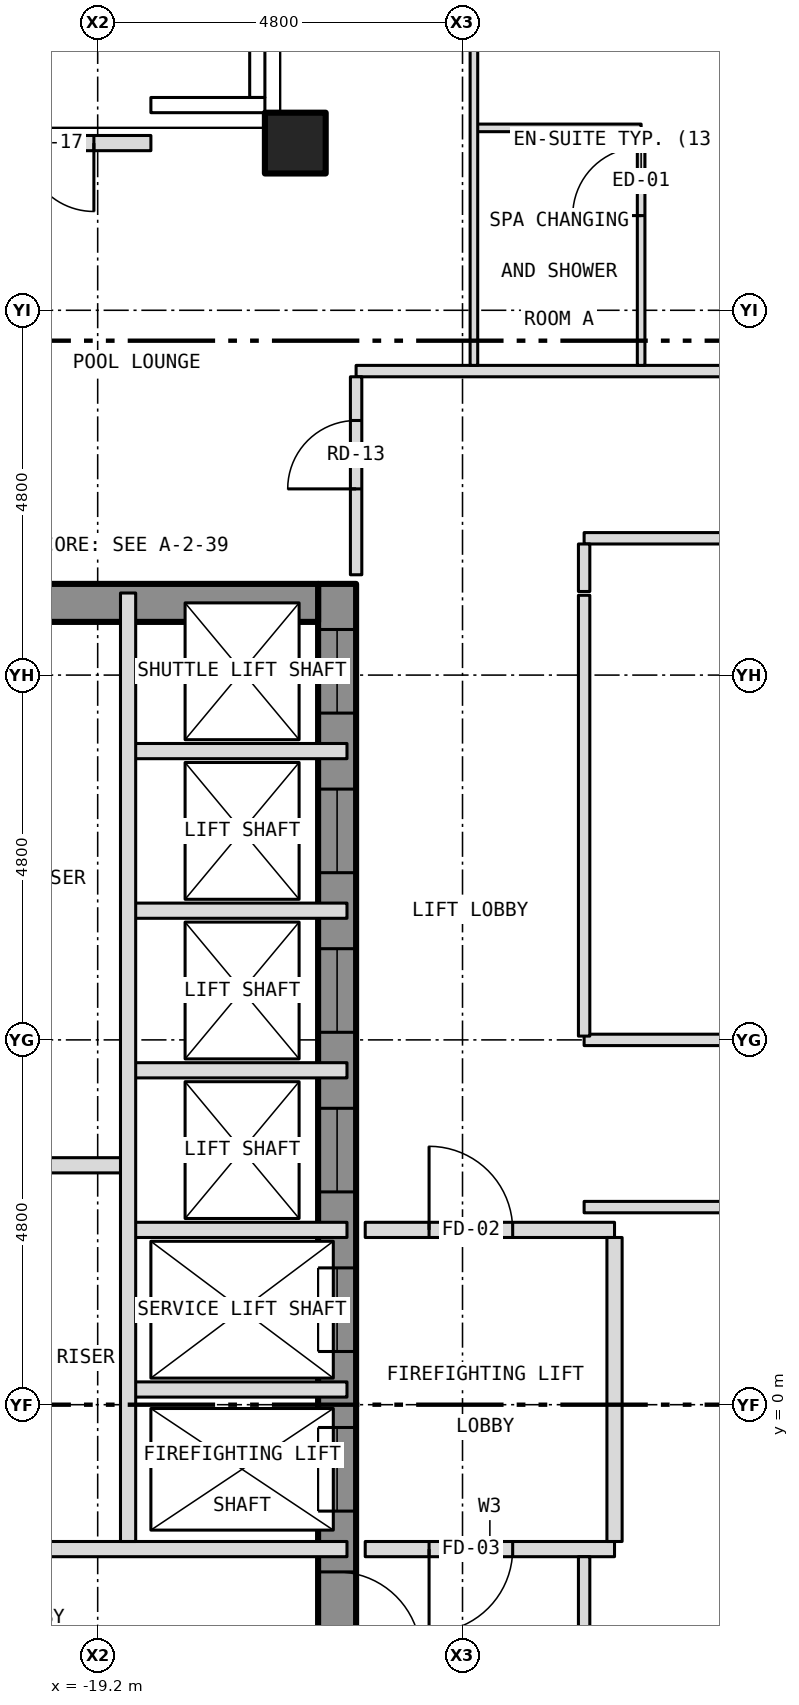
"""IFC4 building model, lengths in metres.
Left out: names, types, materials, properties, quantities, classifications, styles, units other than length and angle.
Written with IfcOpenShell. Run it as: python <this file> out.ifc"""

import sys

from ifc_helpers import new_model, si_unit, direction, frame, frame_2d, origin, origin_2d, place, context, subcontext, project, spatial, rectangle, hollow_rectangle, extrude, element, fill, save


model = new_model("IFC4")
c1 = context("Model", 3, precision=1e-05, world=origin(), true_north=direction((0.0, 1.0)))
c2 = subcontext(c1, "Body", "Model", "MODEL_VIEW")
j1 = project(units=[si_unit("LENGTHUNIT", "METRE"), si_unit("PLANEANGLEUNIT", "RADIAN")], contexts=[c1])
p1 = place(None, origin())
s1 = spatial("IfcSite", under=j1, at=p1, CompositionType="ELEMENT")
p2 = place(p1, origin())
s2 = spatial("IfcBuilding", under=s1, at=p2, CompositionType="ELEMENT")
p3 = place(p2, frame((0.0, 0.0, 142.5)))
s3 = spatial("IfcBuildingStorey", under=s2, at=p3, CompositionType="ELEMENT", Elevation=142.5)
p4 = place(p3, frame((-16.6, 16.6, -0.2), z_axis=(0.0, 0.0, 1.0), x_axis=(1.0, 0.0, 0.0)))
e1 = element("IfcColumn", 1, at=p4, inside=s3, PredefinedType="COLUMN", context=c2, shape_type="SweptSolid", body=[
    extrude(hollow_rectangle(XDim=0.8, YDim=0.8, WallThickness=0.045, at=origin_2d()), origin(), (0.0, 0.0, 1.0), 5.55),
])
p5 = place(p3, frame((-16.05, -10.8, 0.0), z_axis=(0.0, 0.0, 1.0), x_axis=(0.0, 1.0, 0.0)))
e2 = element("IfcWall", 2, at=p5, inside=s3, PredefinedType="SHEAR", context=c2, shape_type="SweptSolid", body=[
    extrude(rectangle(XDim=21.6, YDim=0.5, at=frame_2d((10.8, 0.0))), origin(), (0.0, 0.0, 1.0), 5.25),
])
p6 = place(p5, frame((9.4, 0.0, 0.0)))
e3 = element("IfcOpeningElement", 3, at=p6, cuts=e2, PredefinedType="OPENING", context=c2, shape_type="SweptSolid", body=[
    extrude(rectangle(XDim=1.1, YDim=2.1, at=frame_2d((0.55, 1.05))), frame((0.0, 0.262, 0.0), z_axis=(0.0, -1.0, 0.0), x_axis=(1.0, 0.0, 0.0)), (0.0, 0.0, 1.0), 0.524),
])
p7 = place(p5, frame((11.5, 0.0, 0.0)))
e4 = element("IfcOpeningElement", 4, at=p7, cuts=e2, PredefinedType="OPENING", context=c2, shape_type="SweptSolid", body=[
    extrude(rectangle(XDim=1.1, YDim=2.1, at=frame_2d((0.55, 1.05))), frame((0.0, 0.262, 0.0), z_axis=(0.0, -1.0, 0.0), x_axis=(1.0, 0.0, 0.0)), (0.0, 0.0, 1.0), 0.524),
])
p8 = place(p5, frame((13.6, 0.0, 0.0)))
e5 = element("IfcOpeningElement", 5, at=p8, cuts=e2, PredefinedType="OPENING", context=c2, shape_type="SweptSolid", body=[
    extrude(rectangle(XDim=1.1, YDim=2.1, at=frame_2d((0.55, 1.05))), frame((0.0, 0.262, 0.0), z_axis=(0.0, -1.0, 0.0), x_axis=(1.0, 0.0, 0.0)), (0.0, 0.0, 1.0), 0.524),
])
p9 = place(p5, frame((15.7, 0.0, 0.0)))
e6 = element("IfcOpeningElement", 6, at=p9, cuts=e2, PredefinedType="OPENING", context=c2, shape_type="SweptSolid", body=[
    extrude(rectangle(XDim=1.1, YDim=2.1, at=frame_2d((0.55, 1.05))), frame((0.0, 0.262, 0.0), z_axis=(0.0, -1.0, 0.0), x_axis=(1.0, 0.0, 0.0)), (0.0, 0.0, 1.0), 0.524),
])
p10 = place(p5, frame((17.8, 0.0, 0.0)))
e7 = element("IfcOpeningElement", 7, at=p10, cuts=e2, PredefinedType="OPENING", context=c2, shape_type="SweptSolid", body=[
    extrude(rectangle(XDim=1.1, YDim=2.1, at=frame_2d((0.55, 1.05))), frame((0.0, 0.262, 0.0), z_axis=(0.0, -1.0, 0.0), x_axis=(1.0, 0.0, 0.0)), (0.0, 0.0, 1.0), 0.524),
])
p11 = place(p5, frame((19.9, 0.0, 0.0)))
e8 = element("IfcOpeningElement", 8, at=p11, cuts=e2, PredefinedType="OPENING", context=c2, shape_type="SweptSolid", body=[
    extrude(rectangle(XDim=1.1, YDim=2.1, at=frame_2d((0.55, 1.05))), frame((0.0, 0.262, 0.0), z_axis=(0.0, -1.0, 0.0), x_axis=(1.0, 0.0, 0.0)), (0.0, 0.0, 1.0), 0.524),
])
p12 = place(p5, frame((0.758, 0.0, 0.0)))
e9 = element("IfcOpeningElement", 9, at=p12, cuts=e2, PredefinedType="OPENING", context=c2, shape_type="SweptSolid", body=[
    extrude(rectangle(XDim=1.1, YDim=2.1, at=frame_2d((0.55, 1.05))), frame((0.0, 0.262, 0.0), z_axis=(0.0, -1.0, 0.0), x_axis=(1.0, 0.0, 0.0)), (0.0, 0.0, 1.0), 0.524),
])
p13 = place(p5, frame((7.5, 0.0, 0.0)))
e10 = element("IfcOpeningElement", 10, at=p13, cuts=e2, PredefinedType="OPENING", context=c2, shape_type="SweptSolid", body=[
    extrude(rectangle(XDim=1.1, YDim=2.1, at=frame_2d((0.55, 1.05))), frame((0.0, 0.262, 0.0), z_axis=(0.0, -1.0, 0.0), x_axis=(1.0, 0.0, 0.0)), (0.0, 0.0, 1.0), 0.524),
])
p14 = place(p3, frame((-21.1, 10.55, 0.0), z_axis=(0.0, 0.0, 1.0), x_axis=(1.0, 0.0, 0.0)))
e11 = element("IfcWall", 11, at=p14, inside=s3, PredefinedType="SHEAR", context=c2, shape_type="SweptSolid", body=[
    extrude(rectangle(XDim=4.8, YDim=0.5, at=frame_2d((2.4, 0.0))), origin(), (0.0, 0.0, 1.0), 5.25),
])
p15 = place(p3, frame((-18.5, 16.6, 0.0), z_axis=(0.0, 0.0, 1.0), x_axis=(-1.0, 0.0, 0.0)))
e12 = element("IfcWall", 12, at=p15, inside=s3, PredefinedType="SOLIDWALL", context=c2, shape_type="SweptSolid", body=[
    extrude(rectangle(XDim=2.7, YDim=0.2, at=frame_2d((1.35, 0.0))), origin(), (0.0, 0.0, 1.0), 4.743),
])
p16 = place(p15, frame((0.75, 0.0, 0.0)))
e13 = element("IfcOpeningElement", 13, at=p16, cuts=e12, PredefinedType="OPENING", context=c2, shape_type="SweptSolid", body=[
    extrude(rectangle(XDim=0.9, YDim=2.1, at=frame_2d((0.45, 1.05))), frame((0.0, 0.112, 0.0), z_axis=(0.0, -1.0, 0.0), x_axis=(1.0, 0.0, 0.0)), (0.0, 0.0, 1.0), 0.224),
])
p17 = place(p3, frame((-21.48, -1.9, 0.0), z_axis=(0.0, 0.0, 1.0), x_axis=(1.0, 0.0, 0.0)))
e14 = element("IfcWall", 14, at=p17, inside=s3, PredefinedType="PARTITIONING", context=c2, shape_type="SweptSolid", body=[
    extrude(rectangle(XDim=5.56, YDim=0.2, at=frame_2d((2.78, 0.0))), origin(), (0.0, 0.0, 1.0), 5.25),
])
p18 = place(p3, frame((-15.68, -1.9, 0.0), z_axis=(0.0, 0.0, 1.0), x_axis=(1.0, 0.0, 0.0)))
e15 = element("IfcWall", 15, at=p18, inside=s3, PredefinedType="PARTITIONING", context=c2, shape_type="SweptSolid", body=[
    extrude(rectangle(XDim=3.28, YDim=0.2, at=frame_2d((1.64, 0.0))), origin(), (0.0, 0.0, 1.0), 5.35),
])
p19 = place(p18, frame((0.84, 0.0, 0.0)))
e16 = element("IfcOpeningElement", 16, at=p19, cuts=e15, PredefinedType="OPENING", context=c2, shape_type="SweptSolid", body=[
    extrude(rectangle(XDim=1.1, YDim=2.1, at=frame_2d((0.55, 1.05))), frame((0.0, 0.112, 0.0), z_axis=(0.0, -1.0, 0.0), x_axis=(1.0, 0.0, 0.0)), (0.0, 0.0, 1.0), 0.224),
])
for number, where, z_axis, x_axis in (
    (17, (-18.8, 0.2, 0.0), (0.0, 0.0, 1.0), (1.0, 0.0, 0.0)),
    (18, (-18.8, 2.3, 0.0), (0.0, 0.0, 1.0), (1.0, 0.0, 0.0)),
):
    element("IfcWall", number, at=place(p3, frame(where, z_axis=z_axis, x_axis=x_axis)), inside=s3, PredefinedType="PARTITIONING", context=c2, shape_type="SweptSolid", body=[
        extrude(rectangle(XDim=2.88, YDim=0.2, at=frame_2d((1.44, 0.0))), origin(), (0.0, 0.0, 1.0), 5.25),
    ])
p20 = place(p3, frame((-15.68, 2.3, 0.0), z_axis=(0.0, 0.0, 1.0), x_axis=(1.0, 0.0, 0.0)))
e19 = element("IfcWall", 19, at=p20, inside=s3, PredefinedType="PARTITIONING", context=c2, shape_type="SweptSolid", body=[
    extrude(rectangle(XDim=3.28, YDim=0.2, at=frame_2d((1.64, 0.0))), origin(), (0.0, 0.0, 1.0), 5.35),
])
p21 = place(p20, frame((0.84, 0.0, 0.0)))
e20 = element("IfcOpeningElement", 20, at=p21, cuts=e19, PredefinedType="OPENING", context=c2, shape_type="SweptSolid", body=[
    extrude(rectangle(XDim=1.1, YDim=2.1, at=frame_2d((0.55, 1.05))), frame((0.0, 0.112, 0.0), z_axis=(0.0, -1.0, 0.0), x_axis=(1.0, 0.0, 0.0)), (0.0, 0.0, 1.0), 0.224),
])
p22 = place(p3, frame((-12.8, 2.6, 0.0), z_axis=(0.0, 0.0, 1.0), x_axis=(1.0, 0.0, 0.0)))
e21 = element("IfcWall", 21, at=p22, inside=s3, PredefinedType="PARTITIONING", context=c2, shape_type="SweptSolid", body=[
    extrude(rectangle(XDim=20.3, YDim=0.15, at=frame_2d((10.15, 0.0))), origin(), (0.0, 0.0, 1.0), 5.35),
])
p23 = place(p3, frame((-21.48, 3.15, 0.0), z_axis=(0.0, 0.0, 1.0), x_axis=(1.0, 0.0, 0.0)))
e22 = element("IfcWall", 22, at=p23, inside=s3, PredefinedType="PARTITIONING", context=c2, shape_type="SweptSolid", body=[
    extrude(rectangle(XDim=2.68, YDim=0.2, at=frame_2d((1.34, 0.0))), origin(), (0.0, 0.0, 1.0), 5.25),
])
p24 = place(p3, frame((-18.8, 4.4, 0.0), z_axis=(0.0, 0.0, 1.0), x_axis=(1.0, 0.0, 0.0)))
e23 = element("IfcWall", 23, at=p24, inside=s3, PredefinedType="PARTITIONING", context=c2, shape_type="SweptSolid", body=[
    extrude(rectangle(XDim=2.88, YDim=0.2, at=frame_2d((1.44, 0.0))), origin(), (0.0, 0.0, 1.0), 5.25),
])
p25 = place(p3, frame((-12.8, 4.8, 0.0), z_axis=(0.0, 0.0, 1.0), x_axis=(1.0, 0.0, 0.0)))
e24 = element("IfcWall", 24, at=p25, inside=s3, PredefinedType="PARTITIONING", context=c2, shape_type="SweptSolid", body=[
    extrude(rectangle(XDim=20.3, YDim=0.15, at=frame_2d((10.15, 0.0))), origin(), (0.0, 0.0, 1.0), 5.35),
])
p26 = place(p25, frame((16.1, 0.0, 0.0)))
e25 = element("IfcOpeningElement", 25, at=p26, cuts=e24, PredefinedType="OPENING", context=c2, shape_type="SweptSolid", body=[
    extrude(rectangle(XDim=0.9, YDim=2.1, at=frame_2d((0.45, 1.05))), frame((0.0, 0.087, 0.0), z_axis=(0.0, -1.0, 0.0), x_axis=(1.0, 0.0, 0.0)), (0.0, 0.0, 1.0), 0.174),
])
for number, where, z_axis, x_axis in (
    (26, (-18.8, 6.5, 0.0), (0.0, 0.0, 1.0), (1.0, 0.0, 0.0)),
    (27, (-18.8, 8.6, 0.0), (0.0, 0.0, 1.0), (1.0, 0.0, 0.0)),
):
    element("IfcWall", number, at=place(p3, frame(where, z_axis=z_axis, x_axis=x_axis)), inside=s3, PredefinedType="PARTITIONING", context=c2, shape_type="SweptSolid", body=[
        extrude(rectangle(XDim=2.88, YDim=0.2, at=frame_2d((1.44, 0.0))), origin(), (0.0, 0.0, 1.0), 5.25),
    ])
p27 = place(p3, frame((-12.8, 11.4, 0.0), z_axis=(0.0, 0.0, 1.0), x_axis=(1.0, 0.0, 0.0)))
e28 = element("IfcWall", 28, at=p27, inside=s3, PredefinedType="PARTITIONING", context=c2, shape_type="SweptSolid", body=[
    extrude(rectangle(XDim=20.3, YDim=0.15, at=frame_2d((10.15, 0.0))), origin(), (0.0, 0.0, 1.0), 5.35),
])
p28 = place(p27, frame((5.95, 0.0, 0.0)))
e29 = element("IfcOpeningElement", 29, at=p28, cuts=e28, PredefinedType="OPENING", context=c2, shape_type="SweptSolid", body=[
    extrude(rectangle(XDim=0.9, YDim=2.1, at=frame_2d((0.45, 1.05))), frame((0.0, 0.087, 0.0), z_axis=(0.0, -1.0, 0.0), x_axis=(1.0, 0.0, 0.0)), (0.0, 0.0, 1.0), 0.174),
])
p29 = place(p3, frame((-15.8, 13.6, 0.0), z_axis=(0.0, 0.0, 1.0), x_axis=(1.0, 0.0, 0.0)))
e30 = element("IfcWall", 30, at=p29, inside=s3, PredefinedType="PARTITIONING", context=c2, shape_type="SweptSolid", body=[
    extrude(rectangle(XDim=31.6, YDim=0.15, at=frame_2d((15.8, 0.0))), origin(), (0.0, 0.0, 1.0), 5.35),
])
p30 = place(p29, frame((5.779, 0.0, 0.0)))
e31 = element("IfcOpeningElement", 31, at=p30, cuts=e30, PredefinedType="OPENING", context=c2, shape_type="SweptSolid", body=[
    extrude(rectangle(XDim=0.9, YDim=2.1, at=frame_2d((0.45, 1.05))), frame((0.0, 0.087, 0.0), z_axis=(0.0, -1.0, 0.0), x_axis=(1.0, 0.0, 0.0)), (0.0, 0.0, 1.0), 0.174),
])
p31 = place(p29, frame((15.587, 0.0, 0.0)))
e32 = element("IfcOpeningElement", 32, at=p31, cuts=e30, PredefinedType="OPENING", context=c2, shape_type="SweptSolid", body=[
    extrude(rectangle(XDim=0.9, YDim=2.1, at=frame_2d((0.45, 1.05))), frame((0.0, 0.087, 0.0), z_axis=(0.0, -1.0, 0.0), x_axis=(1.0, 0.0, 0.0)), (0.0, 0.0, 1.0), 0.174),
])
p32 = place(p29, frame((26.911, 0.0, 0.0)))
e33 = element("IfcOpeningElement", 33, at=p32, cuts=e30, PredefinedType="OPENING", context=c2, shape_type="SweptSolid", body=[
    extrude(rectangle(XDim=0.9, YDim=2.1, at=frame_2d((0.45, 1.05))), frame((0.0, 0.087, 0.0), z_axis=(0.0, -1.0, 0.0), x_axis=(1.0, 0.0, 0.0)), (0.0, 0.0, 1.0), 0.174),
])
p33 = place(p3, frame((-14.25, 16.8, 0.0), z_axis=(0.0, 0.0, 1.0), x_axis=(1.0, 0.0, 0.0)))
e34 = element("IfcWall", 34, at=p33, inside=s3, PredefinedType="PARTITIONING", context=c2, shape_type="SweptSolid", body=[
    extrude(rectangle(XDim=2.2, YDim=0.1, at=frame_2d((1.1, 0.0))), origin(), (0.0, 0.0, 1.0), 5.35),
])
p34 = place(p3, frame((-18.8, -1.8, 0.0), z_axis=(0.0, 0.0, 1.0), x_axis=(0.0, 1.0, 0.0)))
e35 = element("IfcWall", 35, at=p34, inside=s3, PredefinedType="PARTITIONING", context=c2, shape_type="SweptSolid", body=[
    extrude(rectangle(XDim=12.48, YDim=0.2, at=frame_2d((6.24, 0.0))), origin(), (0.0, 0.0, 1.0), 5.25),
])
p35 = place(p3, frame((-15.8, 10.92, 0.0), z_axis=(0.0, 0.0, 1.0), x_axis=(0.0, 1.0, 0.0)))
e36 = element("IfcWall", 36, at=p35, inside=s3, PredefinedType="PARTITIONING", context=c2, shape_type="SweptSolid", body=[
    extrude(rectangle(XDim=2.605, YDim=0.15, at=frame_2d((1.302, 0.0))), origin(), (0.0, 0.0, 1.0), 5.35),
])
p36 = place(p35, frame((1.13, 0.0, 0.0)))
e37 = element("IfcOpeningElement", 37, at=p36, cuts=e36, PredefinedType="OPENING", context=c2, shape_type="SweptSolid", body=[
    extrude(rectangle(XDim=0.9, YDim=2.1, at=frame_2d((0.45, 1.05))), frame((0.0, 0.087, 0.0), z_axis=(0.0, -1.0, 0.0), x_axis=(1.0, 0.0, 0.0)), (0.0, 0.0, 1.0), 0.174),
])
p37 = place(p3, frame((-14.25, 13.675, 0.0), z_axis=(0.0, 0.0, 1.0), x_axis=(0.0, 1.0, 0.0)))
e38 = element("IfcWall", 38, at=p37, inside=s3, PredefinedType="PARTITIONING", context=c2, shape_type="SweptSolid", body=[
    extrude(rectangle(XDim=8.355, YDim=0.1, at=frame_2d((4.177, 0.0))), origin(), (0.0, 0.0, 1.0), 4.817),
])
p38 = place(p3, frame((-12.8, -11.325, 0.0), z_axis=(0.0, 0.0, 1.0), x_axis=(0.0, 1.0, 0.0)))
e39 = element("IfcWall", 39, at=p38, inside=s3, PredefinedType="PARTITIONING", context=c2, shape_type="SweptSolid", body=[
    extrude(rectangle(XDim=9.325, YDim=0.15, at=frame_2d((4.663, 0.0))), origin(), (0.0, 0.0, 1.0), 5.35),
])
p39 = place(p38, frame((4.525, 0.0, 0.0)))
e40 = element("IfcOpeningElement", 40, at=p39, cuts=e39, PredefinedType="OPENING", context=c2, shape_type="SweptSolid", body=[
    extrude(rectangle(XDim=0.9, YDim=2.1, at=frame_2d((0.45, 1.05))), frame((0.0, 0.087, 0.0), z_axis=(0.0, -1.0, 0.0), x_axis=(1.0, 0.0, 0.0)), (0.0, 0.0, 1.0), 0.174),
])
p40 = place(p3, frame((-12.8, 4.85, 0.0), z_axis=(0.0, 0.0, 1.0), x_axis=(0.0, 1.0, 0.0)))
e41 = element("IfcWall", 41, at=p40, inside=s3, PredefinedType="PARTITIONING", context=c2, shape_type="SweptSolid", body=[
    extrude(rectangle(XDim=5.8, YDim=0.15, at=frame_2d((2.9, 0.0))), origin(), (0.0, 0.0, 1.0), 5.35),
])
p41 = place(p3, frame((-12.8, 10.7, 0.0), z_axis=(0.0, 0.0, 1.0), x_axis=(0.0, 1.0, 0.0)))
e42 = element("IfcWall", 42, at=p41, inside=s3, PredefinedType="PARTITIONING", context=c2, shape_type="SweptSolid", body=[
    extrude(rectangle(XDim=0.625, YDim=0.15, at=frame_2d((0.312, 0.0))), origin(), (0.0, 0.0, 1.0), 5.35),
])
p42 = place(p3, frame((-12.4, -1.8, 0.0), z_axis=(0.0, 0.0, 1.0), x_axis=(0.0, 1.0, 0.0)))
e43 = element("IfcWall", 43, at=p42, inside=s3, PredefinedType="PARTITIONING", context=c2, shape_type="SweptSolid", body=[
    extrude(rectangle(XDim=4.0, YDim=0.2, at=frame_2d((2.0, 0.0))), origin(), (0.0, 0.0, 1.0), 5.35),
])
p43 = place(p3, frame((-12.05, 13.675, 0.0), z_axis=(0.0, 0.0, 1.0), x_axis=(0.0, 1.0, 0.0)))
e44 = element("IfcWall", 44, at=p43, inside=s3, PredefinedType="PARTITIONING", context=c2, shape_type="SweptSolid", body=[
    extrude(rectangle(XDim=3.075, YDim=0.1, at=frame_2d((1.538, 0.0))), origin(), (0.0, 0.0, 1.0), 5.35),
])
p44 = place(p43, frame((1.971, 0.0, 0.0)))
e45 = element("IfcOpeningElement", 45, at=p44, cuts=e44, PredefinedType="OPENING", context=c2, shape_type="SweptSolid", body=[
    extrude(rectangle(XDim=0.9, YDim=2.1, at=frame_2d((0.45, 1.05))), frame((0.0, 0.062, 0.0), z_axis=(0.0, -1.0, 0.0), x_axis=(1.0, 0.0, 0.0)), (0.0, 0.0, 1.0), 0.124),
])
p45 = place(p16, origin())
e46 = element("IfcDoor", 46, at=p45, inside=s3, OperationType="SINGLE_SWING_LEFT", PredefinedType="DOOR", context=c2, shape_type="SweptSolid", body=[
    extrude(rectangle(XDim=0.9, YDim=2.1, at=frame_2d((0.45, 1.05))), frame((0.0, 0.025, 0.0), z_axis=(0.0, -1.0, 0.0), x_axis=(1.0, 0.0, 0.0)), (0.0, 0.0, 1.0), 0.05),
])
fill(e13, e46)
p46 = place(p6, origin())
e47 = element("IfcDoor", 47, at=p46, inside=s3, OperationType="SLIDING_TO_LEFT", PredefinedType="DOOR", context=c2, shape_type="SweptSolid", body=[
    extrude(rectangle(XDim=1.1, YDim=2.1, at=frame_2d((0.55, 1.05))), frame((0.0, 0.025, 0.0), z_axis=(0.0, -1.0, 0.0), x_axis=(1.0, 0.0, 0.0)), (0.0, 0.0, 1.0), 0.05),
])
fill(e3, e47)
p47 = place(p7, origin())
e48 = element("IfcDoor", 48, at=p47, inside=s3, OperationType="SLIDING_TO_LEFT", PredefinedType="DOOR", context=c2, shape_type="SweptSolid", body=[
    extrude(rectangle(XDim=1.1, YDim=2.1, at=frame_2d((0.55, 1.05))), frame((0.0, 0.025, 0.0), z_axis=(0.0, -1.0, 0.0), x_axis=(1.0, 0.0, 0.0)), (0.0, 0.0, 1.0), 0.05),
])
fill(e4, e48)
p48 = place(p8, origin())
e49 = element("IfcDoor", 49, at=p48, inside=s3, OperationType="SLIDING_TO_LEFT", PredefinedType="DOOR", context=c2, shape_type="SweptSolid", body=[
    extrude(rectangle(XDim=1.1, YDim=2.1, at=frame_2d((0.55, 1.05))), frame((0.0, 0.025, 0.0), z_axis=(0.0, -1.0, 0.0), x_axis=(1.0, 0.0, 0.0)), (0.0, 0.0, 1.0), 0.05),
])
fill(e5, e49)
p49 = place(p9, origin())
e50 = element("IfcDoor", 50, at=p49, inside=s3, OperationType="SLIDING_TO_LEFT", PredefinedType="DOOR", context=c2, shape_type="SweptSolid", body=[
    extrude(rectangle(XDim=1.1, YDim=2.1, at=frame_2d((0.55, 1.05))), frame((0.0, 0.025, 0.0), z_axis=(0.0, -1.0, 0.0), x_axis=(1.0, 0.0, 0.0)), (0.0, 0.0, 1.0), 0.05),
])
fill(e6, e50)
p50 = place(p10, origin())
e51 = element("IfcDoor", 51, at=p50, inside=s3, OperationType="SLIDING_TO_LEFT", PredefinedType="DOOR", context=c2, shape_type="SweptSolid", body=[
    extrude(rectangle(XDim=1.1, YDim=2.1, at=frame_2d((0.55, 1.05))), frame((0.0, 0.025, 0.0), z_axis=(0.0, -1.0, 0.0), x_axis=(1.0, 0.0, 0.0)), (0.0, 0.0, 1.0), 0.05),
])
fill(e7, e51)
p51 = place(p11, origin())
e52 = element("IfcDoor", 52, at=p51, inside=s3, OperationType="SLIDING_TO_LEFT", PredefinedType="DOOR", context=c2, shape_type="SweptSolid", body=[
    extrude(rectangle(XDim=1.1, YDim=2.1, at=frame_2d((0.55, 1.05))), frame((0.0, 0.025, 0.0), z_axis=(0.0, -1.0, 0.0), x_axis=(1.0, 0.0, 0.0)), (0.0, 0.0, 1.0), 0.05),
])
fill(e8, e52)
p52 = place(p13, origin())
e53 = element("IfcDoor", 53, at=p52, inside=s3, OperationType="SINGLE_SWING_LEFT", PredefinedType="DOOR", context=c2, shape_type="SweptSolid", body=[
    extrude(rectangle(XDim=1.1, YDim=2.1, at=frame_2d((0.55, 1.05))), frame((0.0, 0.025, 0.0), z_axis=(0.0, -1.0, 0.0), x_axis=(1.0, 0.0, 0.0)), (0.0, 0.0, 1.0), 0.05),
])
fill(e10, e53)
p53 = place(p21, origin())
e54 = element("IfcDoor", 54, at=p53, inside=s3, OperationType="SINGLE_SWING_LEFT", PredefinedType="DOOR", context=c2, shape_type="SweptSolid", body=[
    extrude(rectangle(XDim=1.1, YDim=2.1, at=frame_2d((0.55, 1.05))), frame((0.0, 0.025, 0.0), z_axis=(0.0, -1.0, 0.0), x_axis=(1.0, 0.0, 0.0)), (0.0, 0.0, 1.0), 0.05),
])
fill(e20, e54)
p54 = place(p19, origin())
e55 = element("IfcDoor", 55, at=p54, inside=s3, OperationType="SINGLE_SWING_LEFT", PredefinedType="DOOR", context=c2, shape_type="SweptSolid", body=[
    extrude(rectangle(XDim=1.1, YDim=2.1, at=frame_2d((0.55, 1.05))), frame((0.0, 0.025, 0.0), z_axis=(0.0, -1.0, 0.0), x_axis=(1.0, 0.0, 0.0)), (0.0, 0.0, 1.0), 0.05),
])
fill(e16, e55)
p55 = place(p44, origin())
e56 = element("IfcDoor", 56, at=p55, inside=s3, OperationType="SINGLE_SWING_LEFT", PredefinedType="DOOR", context=c2, shape_type="SweptSolid", body=[
    extrude(rectangle(XDim=0.9, YDim=2.1, at=frame_2d((0.45, 1.05))), frame((0.0, 0.025, 0.0), z_axis=(0.0, -1.0, 0.0), x_axis=(1.0, 0.0, 0.0)), (0.0, 0.0, 1.0), 0.05),
])
fill(e45, e56)
p56 = place(p36, origin())
e57 = element("IfcDoor", 57, at=p56, inside=s3, OperationType="SINGLE_SWING_LEFT", PredefinedType="DOOR", context=c2, shape_type="SweptSolid", body=[
    extrude(rectangle(XDim=0.9, YDim=2.1, at=frame_2d((0.45, 1.05))), frame((0.0, 0.025, 0.0), z_axis=(0.0, -1.0, 0.0), x_axis=(1.0, 0.0, 0.0)), (0.0, 0.0, 1.0), 0.05),
])
fill(e37, e57)
save(model, sys.argv[1])
